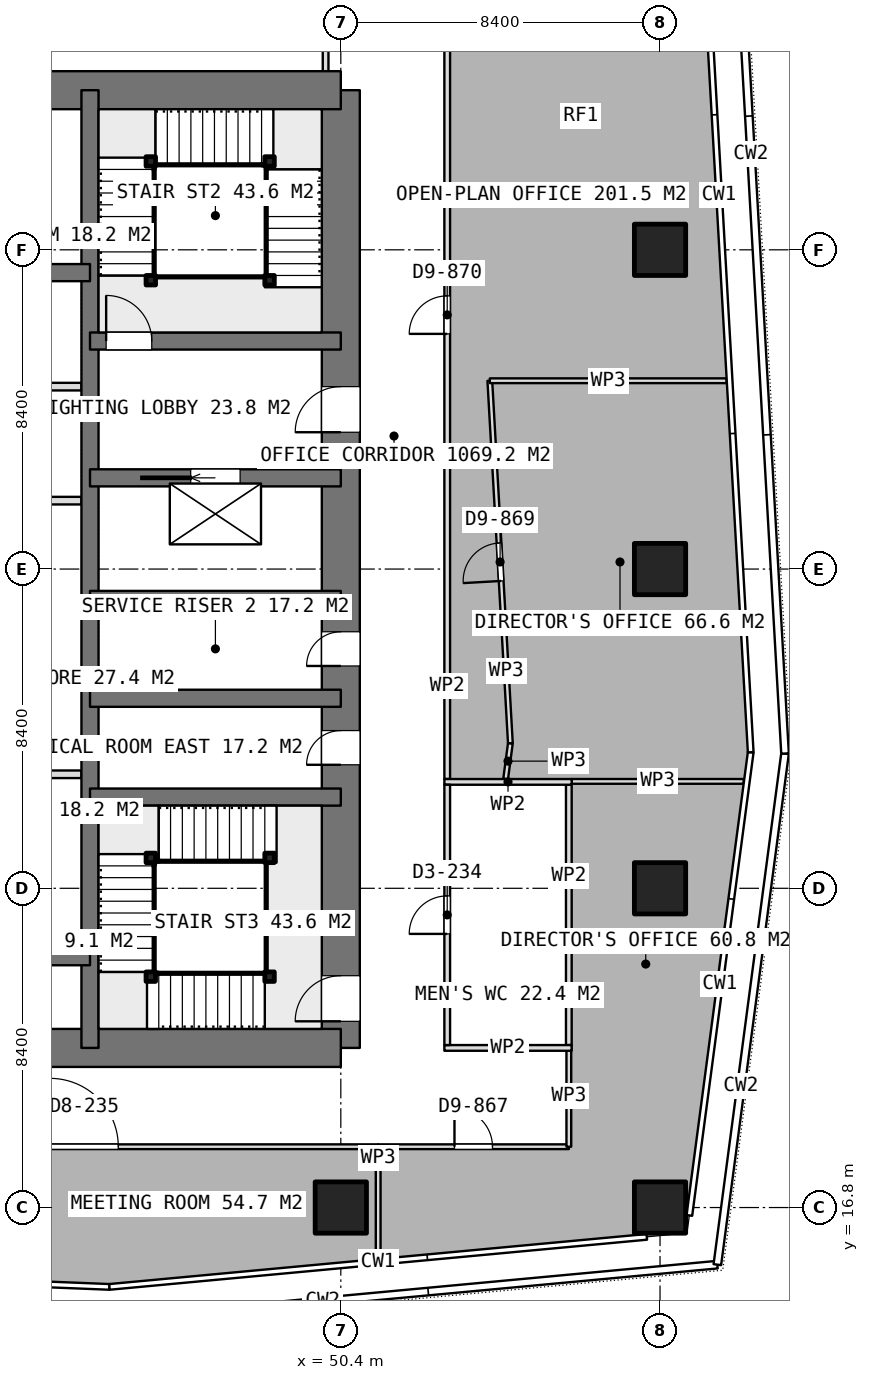
"""IFC4 building model, lengths in metres.
Left out: names, types, materials, properties, quantities, classifications, styles, units other than length and angle.
Written with IfcOpenShell. Run it as: python <this file> out.ifc"""

import sys

from ifc_helpers import new_model, si_unit, direction, frame, frame_2d, origin, origin_2d, place, context, subcontext, project, spatial, rectangle, extrude, element, fill, save


model = new_model("IFC4")
c1 = context("Model", 3, precision=1e-05, world=origin(), true_north=direction((0.0, 1.0)))
c2 = subcontext(c1, "Body", "Model", "MODEL_VIEW")
j1 = project(units=[si_unit("LENGTHUNIT", "METRE"), si_unit("PLANEANGLEUNIT", "RADIAN")], contexts=[c1])
p1 = place(None, origin())
s1 = spatial("IfcSite", under=j1, at=p1, CompositionType="ELEMENT")
p2 = place(p1, origin())
s2 = spatial("IfcBuilding", under=s1, at=p2, CompositionType="ELEMENT")
p3 = place(p2, frame((0.0, 0.0, 217.7)))
s3 = spatial("IfcBuildingStorey", under=s2, at=p3, CompositionType="ELEMENT", Elevation=217.7)
for number, where, z_axis, x_axis in (
    (1, (40.0, 21.0, 0.0), (0.0, 0.0, 1.0), (1.0, 0.0, 0.0)),
    (2, (40.0, 46.2, 0.0), (0.0, 0.0, 1.0), (1.0, 0.0, 0.0)),
):
    element("IfcWall", number, at=place(p3, frame(where, z_axis=z_axis, x_axis=x_axis)), inside=s3, PredefinedType="SHEAR", context=c2, shape_type="SweptSolid", body=[
        extrude(rectangle(XDim=10.4, YDim=1.0, at=frame_2d((5.2, 0.0))), origin(), (0.0, 0.0, 1.0), 3.75),
    ])
p4 = place(p3, frame((50.4, 21.0, 0.0), z_axis=(0.0, 0.0, 1.0), x_axis=(0.0, 1.0, 0.0)))
e3 = element("IfcWall", 3, at=p4, inside=s3, PredefinedType="SHEAR", context=c2, shape_type="SweptSolid", body=[
    extrude(rectangle(XDim=25.2, YDim=1.0, at=frame_2d((12.6, 0.0))), origin(), (0.0, 0.0, 1.0), 3.75),
])
p5 = place(p4, frame((16.2, 0.0, 0.0)))
e4 = element("IfcOpeningElement", 4, at=p5, cuts=e3, PredefinedType="OPENING", context=c2, shape_type="SweptSolid", body=[
    extrude(rectangle(XDim=1.2, YDim=2.1, at=frame_2d((0.6, 1.05))), frame((0.0, 0.51, 0.0), z_axis=(0.0, -1.0, 0.0), x_axis=(1.0, 0.0, 0.0)), (0.0, 0.0, 1.0), 1.02),
])
p6 = place(p4, frame((10.05, 0.0, 0.0)))
e5 = element("IfcOpeningElement", 5, at=p6, cuts=e3, PredefinedType="OPENING", context=c2, shape_type="SweptSolid", body=[
    extrude(rectangle(XDim=0.9, YDim=2.1, at=frame_2d((0.45, 1.05))), frame((0.0, 0.51, 0.0), z_axis=(0.0, -1.0, 0.0), x_axis=(1.0, 0.0, 0.0)), (0.0, 0.0, 1.0), 1.02),
])
p7 = place(p4, frame((7.45, 0.0, 0.0)))
e6 = element("IfcOpeningElement", 6, at=p7, cuts=e3, PredefinedType="OPENING", context=c2, shape_type="SweptSolid", body=[
    extrude(rectangle(XDim=0.9, YDim=2.1, at=frame_2d((0.45, 1.05))), frame((0.0, 0.51, 0.0), z_axis=(0.0, -1.0, 0.0), x_axis=(1.0, 0.0, 0.0)), (0.0, 0.0, 1.0), 1.02),
])
p8 = place(p4, frame((0.7, 0.0, 0.0)))
e7 = element("IfcOpeningElement", 7, at=p8, cuts=e3, PredefinedType="OPENING", context=c2, shape_type="SweptSolid", body=[
    extrude(rectangle(XDim=1.2, YDim=2.1, at=frame_2d((0.6, 1.05))), frame((0.0, 0.51, 0.0), z_axis=(0.0, -1.0, 0.0), x_axis=(1.0, 0.0, 0.0)), (0.0, 0.0, 1.0), 1.02),
])
p9 = place(p3, frame((43.8, 21.0, 0.0), z_axis=(0.0, 0.0, 1.0), x_axis=(0.0, 1.0, 0.0)))
e8 = element("IfcWall", 8, at=p9, inside=s3, PredefinedType="SHEAR", context=c2, shape_type="SweptSolid", body=[
    extrude(rectangle(XDim=25.2, YDim=0.45, at=frame_2d((12.6, 0.0))), origin(), (0.0, 0.0, 1.0), 3.75),
])
for number, where, z_axis, x_axis in (
    (9, (40.0, 23.4, 0.0), (0.0, 0.0, 1.0), (1.0, 0.0, 0.0)),
    (10, (40.0, 41.4, 0.0), (0.0, 0.0, 1.0), (1.0, 0.0, 0.0)),
):
    element("IfcWall", number, at=place(p3, frame(where, z_axis=z_axis, x_axis=x_axis)), inside=s3, PredefinedType="SHEAR", context=c2, shape_type="SweptSolid", body=[
        extrude(rectangle(XDim=3.8, YDim=0.45, at=frame_2d((1.9, 0.0))), origin(), (0.0, 0.0, 1.0), 3.75),
    ])
for number, where, z_axis, x_axis in (
    (11, (43.8, 27.6, 0.0), (0.0, 0.0, 1.0), (1.0, 0.0, 0.0)),
    (12, (43.8, 30.2, 0.0), (0.0, 0.0, 1.0), (1.0, 0.0, 0.0)),
    (13, (43.8, 32.8, 0.0), (0.0, 0.0, 1.0), (1.0, 0.0, 0.0)),
):
    element("IfcWall", number, at=place(p3, frame(where, z_axis=z_axis, x_axis=x_axis)), inside=s3, PredefinedType="SHEAR", context=c2, shape_type="SweptSolid", body=[
        extrude(rectangle(XDim=6.6, YDim=0.45, at=frame_2d((3.3, 0.0))), origin(), (0.0, 0.0, 1.0), 3.75),
    ])
p10 = place(p3, frame((43.8, 36.0, 0.0), z_axis=(0.0, 0.0, 1.0), x_axis=(1.0, 0.0, 0.0)))
e14 = element("IfcWall", 14, at=p10, inside=s3, PredefinedType="SHEAR", context=c2, shape_type="SweptSolid", body=[
    extrude(rectangle(XDim=6.6, YDim=0.45, at=frame_2d((3.3, 0.0))), origin(), (0.0, 0.0, 1.0), 3.75),
])
p11 = place(p10, frame((2.65, 0.0, 0.0)))
e15 = element("IfcOpeningElement", 15, at=p11, cuts=e14, PredefinedType="OPENING", context=c2, shape_type="SweptSolid", body=[
    extrude(rectangle(XDim=1.3, YDim=2.1, at=frame_2d((0.65, 1.05))), frame((0.0, 0.235, 0.0), z_axis=(0.0, -1.0, 0.0), x_axis=(1.0, 0.0, 0.0)), (0.0, 0.0, 1.0), 0.47),
])
p12 = place(p3, frame((43.8, 39.6, 0.0), z_axis=(0.0, 0.0, 1.0), x_axis=(1.0, 0.0, 0.0)))
e16 = element("IfcWall", 16, at=p12, inside=s3, PredefinedType="SHEAR", context=c2, shape_type="SweptSolid", body=[
    extrude(rectangle(XDim=6.6, YDim=0.45, at=frame_2d((3.3, 0.0))), origin(), (0.0, 0.0, 1.0), 3.75),
])
p13 = place(p12, frame((0.425, 0.0, 0.0)))
e17 = element("IfcOpeningElement", 17, at=p13, cuts=e16, PredefinedType="OPENING", context=c2, shape_type="SweptSolid", body=[
    extrude(rectangle(XDim=1.2, YDim=2.1, at=frame_2d((0.6, 1.05))), frame((0.0, 0.235, 0.0), z_axis=(0.0, -1.0, 0.0), x_axis=(1.0, 0.0, 0.0)), (0.0, 0.0, 1.0), 0.47),
])
for number, where, z_axis, x_axis in (
    (18, (50.4, 16.8, 0.0), (0.0, 0.0, 1.0), (1.0, 0.0, 0.0)),
    (19, (58.8, 16.8, 0.0), (0.0, 0.0, 1.0), (1.0, 0.0, 0.0)),
    (20, (58.8, 25.2, 0.0), (0.0, 0.0, 1.0), (1.0, 0.0, 0.0)),
    (21, (58.8, 33.6, 0.0), (0.0, 0.0, 1.0), (1.0, 0.0, 0.0)),
    (22, (58.8, 42.0, 0.0), (0.0, 0.0, 1.0), (1.0, 0.0, 0.0)),
):
    element("IfcColumn", number, at=place(p3, frame(where, z_axis=z_axis, x_axis=x_axis)), inside=s3, PredefinedType="COLUMN", context=c2, shape_type="SweptSolid", body=[
        extrude(rectangle(XDim=1.35, YDim=1.35, at=origin_2d()), origin(), (0.0, 0.0, 1.0), 3.75),
    ])
for number, where, z_axis, x_axis in (
    (23, (40.225, 35.4, 0.0), (0.0, 0.0, 1.0), (1.0, 0.0, 0.0)),
    (24, (40.225, 38.4, 0.0), (0.0, 0.0, 1.0), (1.0, 0.0, 0.0)),
    (25, (40.225, 28.2, 0.0), (0.0, 0.0, 1.0), (1.0, 0.0, 0.0)),
):
    element("IfcWall", number, at=place(p3, frame(where, z_axis=z_axis, x_axis=x_axis)), inside=s3, PredefinedType="PARTITIONING", context=c2, shape_type="SweptSolid", body=[
        extrude(rectangle(XDim=3.35, YDim=0.2, at=frame_2d((1.675, 0.0))), origin(), (0.0, 0.0, 1.0), 3.5),
    ])
p14 = place(p3, frame((50.0, 46.7, 0.0), z_axis=(0.0, 0.0, 1.0), x_axis=(0.0, 1.0, 0.0)))
e26 = element("IfcWall", 26, at=p14, inside=s3, PredefinedType="PARTITIONING", context=c2, shape_type="SweptSolid", body=[
    extrude(rectangle(XDim=2.625, YDim=0.15, at=frame_2d((1.312, 0.0))), origin(), (0.0, 0.0, 1.0), 3.5),
])
for number, where, z_axis, x_axis in (
    (27, (53.125, 21.0, 0.0), (0.0, 0.0, 1.0), (1.0, 0.0, 0.0)),
    (28, (53.125, 28.0, 0.0), (0.0, 0.0, 1.0), (1.0, 0.0, 0.0)),
):
    element("IfcWall", number, at=place(p3, frame(where, z_axis=z_axis, x_axis=x_axis)), inside=s3, PredefinedType="PARTITIONING", context=c2, shape_type="SweptSolid", body=[
        extrude(rectangle(XDim=3.35, YDim=0.15, at=frame_2d((1.675, 0.0))), origin(), (0.0, 0.0, 1.0), 3.5),
    ])
p15 = place(p3, frame((53.2, 21.075, 0.0), z_axis=(0.0, 0.0, 1.0), x_axis=(0.0, 1.0, 0.0)))
e29 = element("IfcWall", 29, at=p15, inside=s3, PredefinedType="PARTITIONING", context=c2, shape_type="SweptSolid", body=[
    extrude(rectangle(XDim=6.85, YDim=0.15, at=frame_2d((3.425, 0.0))), origin(), (0.0, 0.0, 1.0), 3.5),
])
p16 = place(p15, frame((2.925, 0.0, 0.0)))
e30 = element("IfcOpeningElement", 30, at=p16, cuts=e29, PredefinedType="OPENING", context=c2, shape_type="SweptSolid", body=[
    extrude(rectangle(XDim=1.0, YDim=2.1, at=frame_2d((0.5, 1.05))), frame((0.0, 0.085, 0.0), z_axis=(0.0, -1.0, 0.0), x_axis=(1.0, 0.0, 0.0)), (0.0, 0.0, 1.0), 0.17),
])
p17 = place(p3, frame((56.4, 21.075, 0.0), z_axis=(0.0, 0.0, 1.0), x_axis=(0.0, 1.0, 0.0)))
e31 = element("IfcWall", 31, at=p17, inside=s3, PredefinedType="PARTITIONING", context=c2, shape_type="SweptSolid", body=[
    extrude(rectangle(XDim=6.85, YDim=0.15, at=frame_2d((3.425, 0.0))), origin(), (0.0, 0.0, 1.0), 3.5),
])
p18 = place(p3, frame((35.508, 18.4, 0.0), z_axis=(0.0, 0.0, 1.0), x_axis=(1.0, 0.0, 0.0)))
e32 = element("IfcWall", 32, at=p18, inside=s3, PredefinedType="PARTITIONING", context=c2, shape_type="SweptSolid", body=[
    extrude(rectangle(XDim=15.875, YDim=0.125, at=frame_2d((7.938, 0.0))), origin(), (0.0, 0.0, 1.0), 3.5),
])
p19 = place(p18, frame((7.237, 0.0, 0.0)))
e33 = element("IfcOpeningElement", 33, at=p19, cuts=e32, PredefinedType="OPENING", context=c2, shape_type="SweptSolid", body=[
    extrude(rectangle(XDim=1.8, YDim=2.1, at=frame_2d((0.9, 1.05))), frame((0.0, 0.073, 0.0), z_axis=(0.0, -1.0, 0.0), x_axis=(1.0, 0.0, 0.0)), (0.0, 0.0, 1.0), 0.145),
])
p20 = place(p3, frame((51.383, 18.4, 0.0), z_axis=(0.0, 0.0, 1.0), x_axis=(0.0, -1.0, 0.0)))
e34 = element("IfcWall", 34, at=p20, inside=s3, PredefinedType="PARTITIONING", context=c2, shape_type="SweptSolid", body=[
    extrude(rectangle(XDim=2.949, YDim=0.125, at=frame_2d((1.475, 0.0))), origin(), (0.0, 0.0, 1.0), 3.5),
])
p21 = place(p3, frame((51.383, 18.4, 0.0), z_axis=(0.0, 0.0, 1.0), x_axis=(1.0, 0.0, 0.0)))
e35 = element("IfcWall", 35, at=p21, inside=s3, PredefinedType="PARTITIONING", context=c2, shape_type="SweptSolid", body=[
    extrude(rectangle(XDim=5.017, YDim=0.125, at=frame_2d((2.508, 0.0))), origin(), (0.0, 0.0, 1.0), 3.5),
])
p22 = place(p21, frame((2.008, 0.0, 0.0)))
e36 = element("IfcOpeningElement", 36, at=p22, cuts=e35, PredefinedType="OPENING", context=c2, shape_type="SweptSolid", body=[
    extrude(rectangle(XDim=1.0, YDim=2.1, at=frame_2d((0.5, 1.05))), frame((0.0, 0.073, 0.0), z_axis=(0.0, -1.0, 0.0), x_axis=(1.0, 0.0, 0.0)), (0.0, 0.0, 1.0), 0.145),
])
p23 = place(p3, frame((56.4, 18.4, 0.0), z_axis=(0.0, 0.0, 1.0), x_axis=(0.0, 1.0, 0.0)))
e37 = element("IfcWall", 37, at=p23, inside=s3, PredefinedType="PARTITIONING", context=c2, shape_type="SweptSolid", body=[
    extrude(rectangle(XDim=2.675, YDim=0.125, at=frame_2d((1.337, 0.0))), origin(), (0.0, 0.0, 1.0), 3.5),
])
p24 = place(p3, frame((56.476, 28.013, 0.0), z_axis=(0.0, 0.0, 1.0), x_axis=(1.0, 0.0, 0.0)))
e38 = element("IfcWall", 38, at=p24, inside=s3, PredefinedType="PARTITIONING", context=c2, shape_type="SweptSolid", body=[
    extrude(rectangle(XDim=4.528, YDim=0.125, at=frame_2d((2.264, 0.0))), origin(), (0.0, 0.0, 1.0), 3.5),
])
p25 = place(p3, frame((54.737, 28.075, 0.0), z_axis=(0.0, 0.0, 1.0), x_axis=(0.131524288557, 0.991312948326, 0.0)))
e39 = element("IfcWall", 39, at=p25, inside=s3, PredefinedType="PARTITIONING", context=c2, shape_type="SweptSolid", body=[
    extrude(rectangle(XDim=0.95, YDim=0.125, at=frame_2d((0.475, 0.0))), origin(), (0.0, 0.0, 1.0), 3.5),
])
p26 = place(p3, frame((54.862, 29.017, 0.0), z_axis=(0.0, 0.0, 1.0), x_axis=(-0.056632031714, 0.99839511867, 0.0)))
e40 = element("IfcWall", 40, at=p26, inside=s3, PredefinedType="PARTITIONING", context=c2, shape_type="SweptSolid", body=[
    extrude(rectangle(XDim=9.553, YDim=0.125, at=frame_2d((4.777, 0.0))), origin(), (0.0, 0.0, 1.0), 3.5),
])
p27 = place(p26, frame((4.277, 0.0, 0.0)))
e41 = element("IfcOpeningElement", 41, at=p27, cuts=e40, PredefinedType="OPENING", context=c2, shape_type="SweptSolid", body=[
    extrude(rectangle(XDim=1.0, YDim=2.1, at=frame_2d((0.5, 1.05))), frame((0.0, 0.073, 0.0), z_axis=(0.0, -1.0, 0.0), x_axis=(1.0, 0.0, 0.0)), (0.0, 0.0, 1.0), 0.145),
])
p28 = place(p3, frame((54.321, 38.555, 0.0), z_axis=(0.0, 0.0, 1.0), x_axis=(1.0, 0.0, 0.0)))
e42 = element("IfcWall", 42, at=p28, inside=s3, PredefinedType="PARTITIONING", context=c2, shape_type="SweptSolid", body=[
    extrude(rectangle(XDim=6.23, YDim=0.125, at=frame_2d((3.115, 0.0))), origin(), (0.0, 0.0, 1.0), 3.5),
])
p29 = place(p3, frame((53.2, 28.075, 0.0), z_axis=(0.0, 0.0, 1.0), x_axis=(0.0, 1.0, 0.0)))
e43 = element("IfcWall", 43, at=p29, inside=s3, PredefinedType="PARTITIONING", context=c2, shape_type="SweptSolid", body=[
    extrude(rectangle(XDim=24.5, YDim=0.15, at=frame_2d((12.25, 0.0))), origin(), (0.0, 0.0, 1.0), 3.5),
])
p30 = place(p29, frame((11.713, 0.0, 0.0)))
e44 = element("IfcOpeningElement", 44, at=p30, cuts=e43, PredefinedType="OPENING", context=c2, shape_type="SweptSolid", body=[
    extrude(rectangle(XDim=1.0, YDim=2.1, at=frame_2d((0.5, 1.05))), frame((0.0, 0.085, 0.0), z_axis=(0.0, -1.0, 0.0), x_axis=(1.0, 0.0, 0.0)), (0.0, 0.0, 1.0), 0.17),
])
for number, where, z_axis, x_axis in (
    (45, (45.4, 41.2, 0.0), (0.0, 0.0, 1.0), (1.0, 0.0, 0.0)),
    (46, (45.4, 44.325, 0.0), (0.0, 0.0, 1.0), (1.0, 0.0, 0.0)),
    (47, (48.525, 44.325, 0.0), (0.0, 0.0, 1.0), (1.0, 0.0, 0.0)),
    (48, (48.525, 41.2, 0.0), (0.0, 0.0, 1.0), (1.0, 0.0, 0.0)),
    (49, (48.525, 22.875, 0.0), (0.0, 0.0, 1.0), (1.0, 0.0, 0.0)),
    (50, (45.4, 22.875, 0.0), (0.0, 0.0, 1.0), (1.0, 0.0, 0.0)),
    (51, (45.4, 26.0, 0.0), (0.0, 0.0, 1.0), (1.0, 0.0, 0.0)),
    (52, (48.525, 26.0, 0.0), (0.0, 0.0, 1.0), (1.0, 0.0, 0.0)),
):
    element("IfcColumn", number, at=place(p3, frame(where, z_axis=z_axis, x_axis=x_axis)), inside=s3, PredefinedType="COLUMN", context=c2, shape_type="SweptSolid", body=[
        extrude(rectangle(XDim=0.25, YDim=0.25, at=origin_2d()), origin(), (0.0, 0.0, 1.0), 3.75),
    ])
p31 = place(p5, origin())
e53 = element("IfcDoor", 53, at=p31, inside=s3, OperationType="SINGLE_SWING_LEFT", PredefinedType="DOOR", context=c2, shape_type="SweptSolid", body=[
    extrude(rectangle(XDim=1.2, YDim=2.1, at=frame_2d((0.6, 1.05))), frame((0.0, 0.025, 0.0), z_axis=(0.0, -1.0, 0.0), x_axis=(1.0, 0.0, 0.0)), (0.0, 0.0, 1.0), 0.05),
])
fill(e4, e53)
p32 = place(p6, origin())
e54 = element("IfcDoor", 54, at=p32, inside=s3, OperationType="SINGLE_SWING_LEFT", PredefinedType="DOOR", context=c2, shape_type="SweptSolid", body=[
    extrude(rectangle(XDim=0.9, YDim=2.1, at=frame_2d((0.45, 1.05))), frame((0.0, 0.025, 0.0), z_axis=(0.0, -1.0, 0.0), x_axis=(1.0, 0.0, 0.0)), (0.0, 0.0, 1.0), 0.05),
])
fill(e5, e54)
p33 = place(p7, origin())
e55 = element("IfcDoor", 55, at=p33, inside=s3, OperationType="SINGLE_SWING_LEFT", PredefinedType="DOOR", context=c2, shape_type="SweptSolid", body=[
    extrude(rectangle(XDim=0.9, YDim=2.1, at=frame_2d((0.45, 1.05))), frame((0.0, 0.025, 0.0), z_axis=(0.0, -1.0, 0.0), x_axis=(1.0, 0.0, 0.0)), (0.0, 0.0, 1.0), 0.05),
])
fill(e6, e55)
p34 = place(p11, origin())
e56 = element("IfcDoor", 56, at=p34, inside=s3, OperationType="SLIDING_TO_LEFT", PredefinedType="USERDEFINED", context=c2, shape_type="SweptSolid", body=[
    extrude(rectangle(XDim=1.3, YDim=2.1, at=frame_2d((0.65, 1.05))), frame((0.0, 0.025, 0.0), z_axis=(0.0, -1.0, 0.0), x_axis=(1.0, 0.0, 0.0)), (0.0, 0.0, 1.0), 0.05),
])
fill(e15, e56)
p35 = place(p16, origin())
e57 = element("IfcDoor", 57, at=p35, inside=s3, OperationType="SINGLE_SWING_LEFT", PredefinedType="DOOR", context=c2, shape_type="SweptSolid", body=[
    extrude(rectangle(XDim=1.0, YDim=2.1, at=frame_2d((0.5, 1.05))), frame((0.0, 0.025, 0.0), z_axis=(0.0, -1.0, 0.0), x_axis=(1.0, 0.0, 0.0)), (0.0, 0.0, 1.0), 0.05),
])
fill(e30, e57)
p36 = place(p19, origin())
e58 = element("IfcDoor", 58, at=p36, inside=s3, OperationType="DOUBLE_DOOR_SINGLE_SWING", PredefinedType="DOOR", context=c2, shape_type="SweptSolid", body=[
    extrude(rectangle(XDim=1.8, YDim=2.1, at=frame_2d((0.9, 1.05))), frame((0.0, 0.025, 0.0), z_axis=(0.0, -1.0, 0.0), x_axis=(1.0, 0.0, 0.0)), (0.0, 0.0, 1.0), 0.05),
])
fill(e33, e58)
p37 = place(p22, origin())
e59 = element("IfcDoor", 59, at=p37, inside=s3, OperationType="SINGLE_SWING_LEFT", PredefinedType="DOOR", context=c2, shape_type="SweptSolid", body=[
    extrude(rectangle(XDim=1.0, YDim=2.1, at=frame_2d((0.5, 1.05))), frame((0.0, 0.025, 0.0), z_axis=(0.0, -1.0, 0.0), x_axis=(1.0, 0.0, 0.0)), (0.0, 0.0, 1.0), 0.05),
])
fill(e36, e59)
p38 = place(p27, origin())
e60 = element("IfcDoor", 60, at=p38, inside=s3, OperationType="SINGLE_SWING_LEFT", PredefinedType="DOOR", context=c2, shape_type="SweptSolid", body=[
    extrude(rectangle(XDim=1.0, YDim=2.1, at=frame_2d((0.5, 1.05))), frame((0.0, 0.025, 0.0), z_axis=(0.0, -1.0, 0.0), x_axis=(1.0, 0.0, 0.0)), (0.0, 0.0, 1.0), 0.05),
])
fill(e41, e60)
p39 = place(p30, origin())
e61 = element("IfcDoor", 61, at=p39, inside=s3, OperationType="SINGLE_SWING_LEFT", PredefinedType="DOOR", context=c2, shape_type="SweptSolid", body=[
    extrude(rectangle(XDim=1.0, YDim=2.1, at=frame_2d((0.5, 1.05))), frame((0.0, 0.025, 0.0), z_axis=(0.0, -1.0, 0.0), x_axis=(1.0, 0.0, 0.0)), (0.0, 0.0, 1.0), 0.05),
])
fill(e44, e61)
p40 = place(p13, origin())
e62 = element("IfcDoor", 62, at=p40, inside=s3, OperationType="SINGLE_SWING_RIGHT", PredefinedType="DOOR", context=c2, shape_type="SweptSolid", body=[
    extrude(rectangle(XDim=1.2, YDim=2.1, at=frame_2d((0.6, 1.05))), frame((0.0, 0.025, 0.0), z_axis=(0.0, -1.0, 0.0), x_axis=(1.0, 0.0, 0.0)), (0.0, 0.0, 1.0), 0.05),
])
fill(e17, e62)
p41 = place(p8, origin())
e63 = element("IfcDoor", 63, at=p41, inside=s3, OperationType="SINGLE_SWING_RIGHT", PredefinedType="DOOR", context=c2, shape_type="SweptSolid", body=[
    extrude(rectangle(XDim=1.2, YDim=2.1, at=frame_2d((0.6, 1.05))), frame((0.0, 0.025, 0.0), z_axis=(0.0, -1.0, 0.0), x_axis=(1.0, 0.0, 0.0)), (0.0, 0.0, 1.0), 0.05),
])
fill(e7, e63)
save(model, sys.argv[1])
